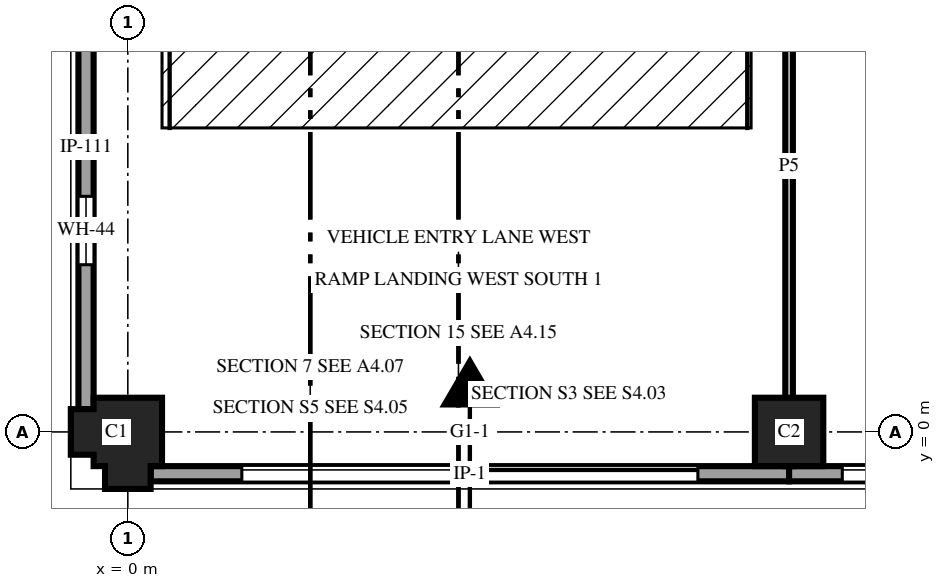
"""IFC4 building model, lengths in metres.
Left out: names, types, materials, properties, quantities, classifications, styles, units other than length and angle.
Written with IfcOpenShell. Run it as: python <this file> out.ifc"""

import sys

from ifc_helpers import new_model, si_unit, direction, frame, frame_2d, origin, place, context, subcontext, project, spatial, polyline, rectangle, outline, extrude, element, fill, save


model = new_model("IFC4")
c1 = context("Model", 3, precision=1e-05, world=origin(), true_north=direction((0.0, 1.0)))
c2 = subcontext(c1, "Body", "Model", "MODEL_VIEW")
j1 = project(units=[si_unit("LENGTHUNIT", "METRE"), si_unit("PLANEANGLEUNIT", "RADIAN")], contexts=[c1])
p1 = place(None, origin())
s1 = spatial("IfcSite", under=j1, at=p1, CompositionType="ELEMENT")
p2 = place(p1, origin())
s2 = spatial("IfcBuilding", under=s1, at=p2, CompositionType="ELEMENT")
p3 = place(p2, origin())
s3 = spatial("IfcBuildingStorey", under=s2, at=p3, CompositionType="ELEMENT", Elevation=0.0)
p4 = place(p3, frame((0.0, 0.0, 0.0), z_axis=(0.0, 0.0, 1.0), x_axis=(-1.0, 0.0, 0.0)))
e1 = element("IfcColumn", 1, at=p4, inside=s3, PredefinedType="COLUMN", context=c2, shape_type="SweptSolid", body=[
    extrude(outline(polyline([(-0.45, -0.45), (0.45, -0.45), (0.45, -0.3), (0.75, -0.3), (0.75, 0.3), (0.45, 0.3), (0.45, 0.45), (0.3, 0.45), (0.3, 0.75), (-0.3, 0.75), (-0.3, 0.45), (-0.45, 0.45), (-0.45, -0.45)])), origin(), (0.0, 0.0, 1.0), 4.5),
])
p5 = place(p3, frame((8.7, 0.0, 0.0), z_axis=(0.0, 0.0, 1.0), x_axis=(1.0, 0.0, 0.0)))
e2 = element("IfcColumn", 2, at=p5, inside=s3, PredefinedType="COLUMN", context=c2, shape_type="SweptSolid", body=[
    extrude(outline(polyline([(-0.45, -0.45), (0.45, -0.45), (0.45, 0.45), (-0.45, 0.45), (-0.45, -0.45)])), origin(), (0.0, 0.0, 1.0), 4.5),
])
p6 = place(p3, frame((0.3, -0.55, 0.0), z_axis=(0.0, 0.0, 1.0), x_axis=(1.0, 0.0, 0.0)))
e3 = element("IfcWall", 3, at=p6, inside=s3, PredefinedType="SOLIDWALL", context=c2, shape_type="SweptSolid", body=[
    extrude(outline(polyline([(0.0, 0.0), (8.4, 0.0), (8.4, 2.9), (7.502, 2.9), (7.5, 2.8), (7.087, 2.812), (6.675, 2.822), (6.262, 2.831), (5.85, 2.837), (5.438, 2.843), (5.025, 2.847), (4.613, 2.849), (4.2, 2.85), (3.788, 2.849), (3.375, 2.847), (2.962, 2.843), (2.55, 2.837), (2.137, 2.831), (1.725, 2.822), (1.312, 2.812), (0.9, 2.8), (0.898, 2.9), (0.0, 2.9), (0.0, 0.0)])), frame((0.0, 0.1, 0.0), z_axis=(0.0, -1.0, 0.0), x_axis=(1.0, 0.0, 0.0)), (0.0, 0.0, 1.0), 0.2),
])
p7 = place(p6, frame((1.2, 0.0, 0.0)))
e4 = element("IfcOpeningElement", 4, at=p7, cuts=e3, PredefinedType="OPENING", context=c2, shape_type="SweptSolid", body=[
    extrude(rectangle(XDim=6.0, YDim=2.65, at=frame_2d((3.0, 1.325))), frame((0.0, 0.11, 0.0), z_axis=(0.0, -1.0, 0.0), x_axis=(1.0, 0.0, 0.0)), (0.0, 0.0, 1.0), 0.22),
])
p8 = place(p3, frame((8.7, -0.55, 0.0), z_axis=(0.0, 0.0, 1.0), x_axis=(1.0, 0.0, 0.0)))
e5 = element("IfcWall", 5, at=p8, inside=s3, PredefinedType="SOLIDWALL", context=c2, shape_type="SweptSolid", body=[
    extrude(outline(polyline([(0.0, 0.0), (8.4, 0.0), (8.4, 2.9), (8.102, 2.9), (8.1, 2.8), (7.613, 2.812), (7.125, 2.822), (6.637, 2.831), (6.15, 2.837), (5.663, 2.843), (5.175, 2.847), (4.688, 2.849), (4.2, 2.85), (3.712, 2.849), (3.225, 2.847), (2.738, 2.843), (2.25, 2.837), (1.762, 2.831), (1.275, 2.822), (0.788, 2.812), (0.3, 2.8), (0.298, 2.9), (0.0, 2.9), (0.0, 0.0)])), frame((0.0, 0.1, 0.0), z_axis=(0.0, -1.0, 0.0), x_axis=(1.0, 0.0, 0.0)), (0.0, 0.0, 1.0), 0.2),
])
p9 = place(p8, frame((0.7, 0.0, 0.0)))
e6 = element("IfcOpeningElement", 6, at=p9, cuts=e5, PredefinedType="OPENING", context=c2, shape_type="SweptSolid", body=[
    extrude(rectangle(XDim=5.4, YDim=2.65, at=frame_2d((2.7, 1.325))), frame((0.0, 0.11, 0.0), z_axis=(0.0, -1.0, 0.0), x_axis=(1.0, 0.0, 0.0)), (0.0, 0.0, 1.0), 0.22),
])
p10 = place(p8, frame((6.6, 0.0, 0.0)))
e7 = element("IfcOpeningElement", 7, at=p10, cuts=e5, PredefinedType="OPENING", context=c2, shape_type="SweptSolid", body=[
    extrude(rectangle(XDim=1.1, YDim=2.1, at=frame_2d((0.55, 1.05))), frame((0.0, 0.11, 0.0), z_axis=(0.0, -1.0, 0.0), x_axis=(1.0, 0.0, 0.0)), (0.0, 0.0, 1.0), 0.22),
])
p11 = place(p3, frame((-0.55, 7.2, 0.0), z_axis=(0.0, 0.0, 1.0), x_axis=(0.0, -1.0, 0.0)))
e8 = element("IfcWall", 8, at=p11, inside=s3, PredefinedType="SOLIDWALL", context=c2, shape_type="SweptSolid", body=[
    extrude(outline(polyline([(0.0, 0.0), (6.9, 0.0), (6.9, 3.1), (6.002, 3.1), (6.0, 2.4), (5.681, 2.56), (5.363, 2.695), (5.044, 2.806), (4.725, 2.895), (4.406, 2.963), (4.087, 3.012), (3.769, 3.041), (3.45, 3.05), (3.131, 3.041), (2.812, 3.012), (2.494, 2.963), (2.175, 2.895), (1.856, 2.806), (1.538, 2.695), (1.219, 2.56), (0.9, 2.4), (0.898, 3.1), (0.0, 3.1), (0.0, 0.0)])), frame((0.0, 0.1, 0.0), z_axis=(0.0, -1.0, 0.0), x_axis=(1.0, 0.0, 0.0)), (0.0, 0.0, 1.0), 0.2),
])
p12 = place(p11, frame((4.1, 0.0, 2.4)))
e9 = element("IfcOpeningElement", 9, at=p12, cuts=e8, PredefinedType="OPENING", context=c2, shape_type="SweptSolid", body=[
    extrude(rectangle(XDim=0.9, YDim=0.32, at=frame_2d((0.45, 0.16))), frame((0.0, 0.11, 0.0), z_axis=(0.0, -1.0, 0.0), x_axis=(1.0, 0.0, 0.0)), (0.0, 0.0, 1.0), 0.22),
])
p13 = place(p3, frame((8.7, 7.45, 0.0), z_axis=(0.0, 0.0, 1.0), x_axis=(0.0, -1.0, 0.0)))
e10 = element("IfcWall", 10, at=p13, inside=s3, PredefinedType="PARTITIONING", context=c2, shape_type="SweptSolid", body=[
    extrude(rectangle(XDim=7.9, YDim=0.1, at=frame_2d((3.95, 0.0))), origin(), (0.0, 0.0, 1.0), 3.4),
])
p14 = place(p7, frame((6.0, 0.0, 0.0), z_axis=(0.0, 0.0, 1.0), x_axis=(-1.0, 0.0, 0.0)))
e11 = element("IfcDoor", 11, at=p14, inside=s3, OperationType="SINGLE_SWING_LEFT", PredefinedType="GATE", context=c2, shape_type="SweptSolid", body=[
    extrude(rectangle(XDim=6.0, YDim=2.65, at=frame_2d((3.0, 1.325))), frame((0.0, 0.025, 0.0), z_axis=(0.0, -1.0, 0.0), x_axis=(1.0, 0.0, 0.0)), (0.0, 0.0, 1.0), 0.05),
])
fill(e4, e11)
p15 = place(p9, frame((5.4, 0.0, 0.0), z_axis=(0.0, 0.0, 1.0), x_axis=(-1.0, 0.0, 0.0)))
e12 = element("IfcDoor", 12, at=p15, inside=s3, OperationType="SINGLE_SWING_LEFT", PredefinedType="GATE", context=c2, shape_type="SweptSolid", body=[
    extrude(rectangle(XDim=5.4, YDim=2.65, at=frame_2d((2.7, 1.325))), frame((0.0, 0.025, 0.0), z_axis=(0.0, -1.0, 0.0), x_axis=(1.0, 0.0, 0.0)), (0.0, 0.0, 1.0), 0.05),
])
fill(e6, e12)
p16 = place(p12, origin())
e13 = element("IfcWindow", 13, at=p16, inside=s3, PartitioningType="SINGLE_PANEL", PredefinedType="WINDOW", context=c2, shape_type="SweptSolid", body=[
    extrude(rectangle(XDim=0.9, YDim=0.32, at=frame_2d((0.45, 0.16))), frame((0.0, 0.03, 0.0), z_axis=(0.0, -1.0, 0.0), x_axis=(1.0, 0.0, 0.0)), (0.0, 0.0, 1.0), 0.06),
])
fill(e9, e13)
save(model, sys.argv[1])
